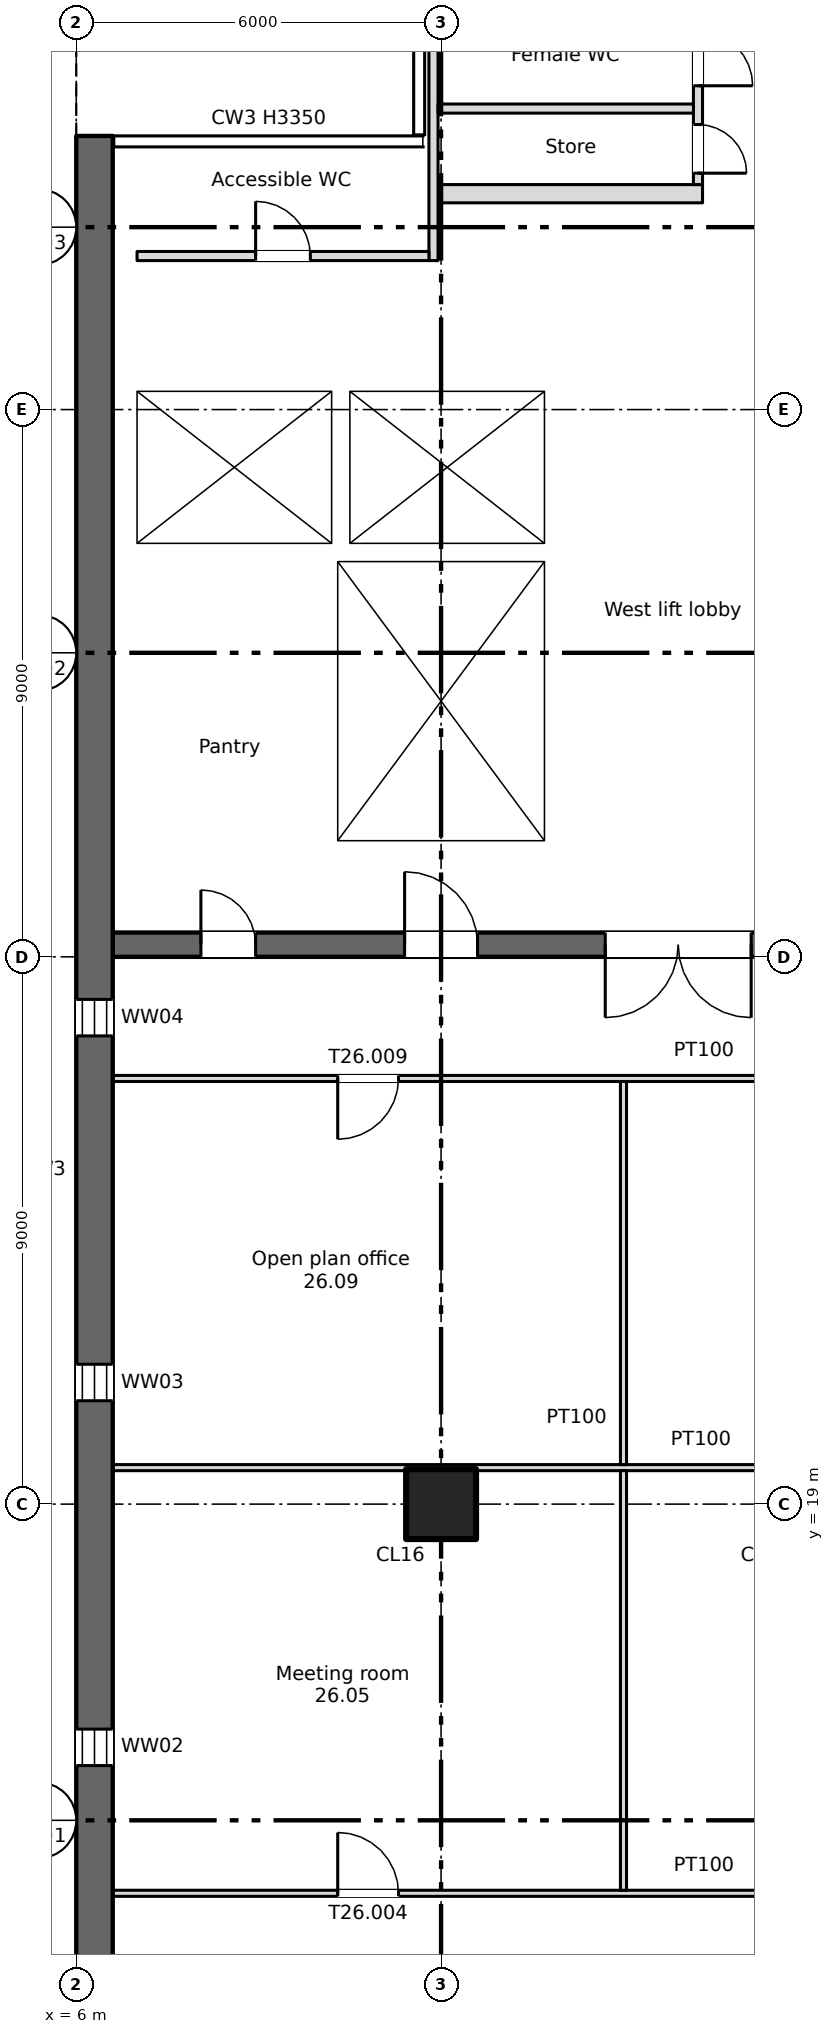
"""IFC4 building model, lengths in metres.
Left out: names, types, materials, properties, quantities, classifications, styles, units other than length and angle.
Written with IfcOpenShell. Run it as: python <this file> out.ifc"""

import sys

from ifc_helpers import new_model, si_unit, direction, frame, frame_2d, origin, origin_2d, place, context, subcontext, project, spatial, rectangle, extrude, element, fill, save


model = new_model("IFC4")
c1 = context("Model", 3, precision=1e-05, world=origin(), true_north=direction((0.0, 1.0)))
c2 = subcontext(c1, "Body", "Model", "MODEL_VIEW")
j1 = project(units=[si_unit("LENGTHUNIT", "METRE"), si_unit("PLANEANGLEUNIT", "RADIAN")], contexts=[c1])
p1 = place(None, origin())
s1 = spatial("IfcSite", under=j1, at=p1, CompositionType="ELEMENT")
p2 = place(p1, origin())
s2 = spatial("IfcBuilding", under=s1, at=p2, CompositionType="ELEMENT")
p3 = place(p2, frame((0.0, 0.0, 178.0)))
s3 = spatial("IfcBuildingStorey", under=s2, at=p3, CompositionType="ELEMENT", Elevation=178.0)
p4 = place(p3, frame((12.0, 19.0, 0.0), z_axis=(0.0, 0.0, 1.0), x_axis=(1.0, 0.0, 0.0)))
e1 = element("IfcColumn", 1, at=p4, inside=s3, PredefinedType="COLUMN", context=c2, shape_type="SweptSolid", body=[
    extrude(rectangle(XDim=1.15, YDim=1.15, at=origin_2d()), origin(), (0.0, 0.0, 1.0), 3.35),
])
p5 = place(p3, frame((6.3, 7.5, 0.0), z_axis=(0.0, 0.0, 1.0), x_axis=(0.0, 1.0, 0.0)))
e2 = element("IfcWall", 2, at=p5, inside=s3, PredefinedType="SHEAR", context=c2, shape_type="SweptSolid", body=[
    extrude(rectangle(XDim=34.0, YDim=0.6, at=frame_2d((17.0, 0.0))), origin(), (0.0, 0.0, 1.0), 3.35),
])
p6 = place(p5, frame((1.2, 0.0, 0.6)))
e3 = element("IfcOpeningElement", 3, at=p6, cuts=e2, PredefinedType="OPENING", context=c2, shape_type="SweptSolid", body=[
    extrude(rectangle(XDim=0.6, YDim=2.4, at=frame_2d((0.3, 1.2))), frame((0.0, 0.31, 0.0), z_axis=(0.0, -1.0, 0.0), x_axis=(1.0, 0.0, 0.0)), (0.0, 0.0, 1.0), 0.62),
])
p7 = place(p5, frame((7.2, 0.0, 0.6)))
e4 = element("IfcOpeningElement", 4, at=p7, cuts=e2, PredefinedType="OPENING", context=c2, shape_type="SweptSolid", body=[
    extrude(rectangle(XDim=0.6, YDim=2.4, at=frame_2d((0.3, 1.2))), frame((0.0, 0.31, 0.0), z_axis=(0.0, -1.0, 0.0), x_axis=(1.0, 0.0, 0.0)), (0.0, 0.0, 1.0), 0.62),
])
p8 = place(p5, frame((13.2, 0.0, 0.6)))
e5 = element("IfcOpeningElement", 5, at=p8, cuts=e2, PredefinedType="OPENING", context=c2, shape_type="SweptSolid", body=[
    extrude(rectangle(XDim=0.6, YDim=2.4, at=frame_2d((0.3, 1.2))), frame((0.0, 0.31, 0.0), z_axis=(0.0, -1.0, 0.0), x_axis=(1.0, 0.0, 0.0)), (0.0, 0.0, 1.0), 0.62),
])
p9 = place(p5, frame((19.2, 0.0, 0.6)))
e6 = element("IfcOpeningElement", 6, at=p9, cuts=e2, PredefinedType="OPENING", context=c2, shape_type="SweptSolid", body=[
    extrude(rectangle(XDim=0.6, YDim=2.4, at=frame_2d((0.3, 1.2))), frame((0.0, 0.31, 0.0), z_axis=(0.0, -1.0, 0.0), x_axis=(1.0, 0.0, 0.0)), (0.0, 0.0, 1.0), 0.62),
])
p10 = place(p3, frame((6.6, 28.2, 0.0), z_axis=(0.0, 0.0, 1.0), x_axis=(1.0, 0.0, 0.0)))
e7 = element("IfcWall", 7, at=p10, inside=s3, PredefinedType="SHEAR", context=c2, shape_type="SweptSolid", body=[
    extrude(rectangle(XDim=57.9, YDim=0.4, at=frame_2d((28.95, 0.0))), origin(), (0.0, 0.0, 1.0), 3.35),
])
p11 = place(p10, frame((12.163, 0.0, 0.0)))
e8 = element("IfcOpeningElement", 8, at=p11, cuts=e7, PredefinedType="OPENING", context=c2, shape_type="SweptSolid", body=[
    extrude(rectangle(XDim=0.9, YDim=2.1, at=frame_2d((0.45, 1.05))), frame((0.0, 0.21, 0.0), z_axis=(0.0, -1.0, 0.0), x_axis=(1.0, 0.0, 0.0)), (0.0, 0.0, 1.0), 0.42),
])
p12 = place(p10, frame((14.738, 0.0, 0.0)))
e9 = element("IfcOpeningElement", 9, at=p12, cuts=e7, PredefinedType="OPENING", context=c2, shape_type="SweptSolid", body=[
    extrude(rectangle(XDim=0.9, YDim=2.1, at=frame_2d((0.45, 1.05))), frame((0.0, 0.21, 0.0), z_axis=(0.0, -1.0, 0.0), x_axis=(1.0, 0.0, 0.0)), (0.0, 0.0, 1.0), 0.42),
])
p13 = place(p10, frame((49.163, 0.0, 0.0)))
e10 = element("IfcOpeningElement", 10, at=p13, cuts=e7, PredefinedType="OPENING", context=c2, shape_type="SweptSolid", body=[
    extrude(rectangle(XDim=0.9, YDim=2.1, at=frame_2d((0.45, 1.05))), frame((0.0, 0.21, 0.0), z_axis=(0.0, -1.0, 0.0), x_axis=(1.0, 0.0, 0.0)), (0.0, 0.0, 1.0), 0.42),
])
p14 = place(p10, frame((51.738, 0.0, 0.0)))
e11 = element("IfcOpeningElement", 11, at=p14, cuts=e7, PredefinedType="OPENING", context=c2, shape_type="SweptSolid", body=[
    extrude(rectangle(XDim=0.9, YDim=2.1, at=frame_2d((0.45, 1.05))), frame((0.0, 0.21, 0.0), z_axis=(0.0, -1.0, 0.0), x_axis=(1.0, 0.0, 0.0)), (0.0, 0.0, 1.0), 0.42),
])
p15 = place(p10, frame((1.45, 0.0, 0.0)))
e12 = element("IfcOpeningElement", 12, at=p15, cuts=e7, PredefinedType="OPENING", context=c2, shape_type="SweptSolid", body=[
    extrude(rectangle(XDim=0.9, YDim=2.1, at=frame_2d((0.45, 1.05))), frame((0.0, 0.21, 0.0), z_axis=(0.0, -1.0, 0.0), x_axis=(1.0, 0.0, 0.0)), (0.0, 0.0, 1.0), 0.42),
])
p16 = place(p10, frame((4.8, 0.0, 0.0)))
e13 = element("IfcOpeningElement", 13, at=p16, cuts=e7, PredefinedType="OPENING", context=c2, shape_type="SweptSolid", body=[
    extrude(rectangle(XDim=1.2, YDim=2.1, at=frame_2d((0.6, 1.05))), frame((0.0, 0.21, 0.0), z_axis=(0.0, -1.0, 0.0), x_axis=(1.0, 0.0, 0.0)), (0.0, 0.0, 1.0), 0.42),
])
p17 = place(p10, frame((31.8, 0.0, 0.0)))
e14 = element("IfcOpeningElement", 14, at=p17, cuts=e7, PredefinedType="OPENING", context=c2, shape_type="SweptSolid", body=[
    extrude(rectangle(XDim=1.2, YDim=2.1, at=frame_2d((0.6, 1.05))), frame((0.0, 0.21, 0.0), z_axis=(0.0, -1.0, 0.0), x_axis=(1.0, 0.0, 0.0)), (0.0, 0.0, 1.0), 0.42),
])
p18 = place(p10, frame((55.3, 0.0, 0.0)))
e15 = element("IfcOpeningElement", 15, at=p18, cuts=e7, PredefinedType="OPENING", context=c2, shape_type="SweptSolid", body=[
    extrude(rectangle(XDim=1.2, YDim=2.1, at=frame_2d((0.6, 1.05))), frame((0.0, 0.21, 0.0), z_axis=(0.0, -1.0, 0.0), x_axis=(1.0, 0.0, 0.0)), (0.0, 0.0, 1.0), 0.42),
])
p19 = place(p10, frame((21.8, 0.0, 0.0)))
e16 = element("IfcOpeningElement", 16, at=p19, cuts=e7, PredefinedType="OPENING", context=c2, shape_type="SweptSolid", body=[
    extrude(rectangle(XDim=1.2, YDim=2.1, at=frame_2d((0.6, 1.05))), frame((0.0, 0.21, 0.0), z_axis=(0.0, -1.0, 0.0), x_axis=(1.0, 0.0, 0.0)), (0.0, 0.0, 1.0), 0.42),
])
p20 = place(p10, frame((41.8, 0.0, 0.0)))
e17 = element("IfcOpeningElement", 17, at=p20, cuts=e7, PredefinedType="OPENING", context=c2, shape_type="SweptSolid", body=[
    extrude(rectangle(XDim=1.2, YDim=2.1, at=frame_2d((0.6, 1.05))), frame((0.0, 0.21, 0.0), z_axis=(0.0, -1.0, 0.0), x_axis=(1.0, 0.0, 0.0)), (0.0, 0.0, 1.0), 0.42),
])
p21 = place(p10, frame((24.95, 0.0, 0.0)))
e18 = element("IfcOpeningElement", 18, at=p21, cuts=e7, PredefinedType="OPENING", context=c2, shape_type="SweptSolid", body=[
    extrude(rectangle(XDim=2.4, YDim=2.1, at=frame_2d((1.2, 1.05))), frame((0.0, 0.21, 0.0), z_axis=(0.0, -1.0, 0.0), x_axis=(1.0, 0.0, 0.0)), (0.0, 0.0, 1.0), 0.42),
])
p22 = place(p10, frame((37.45, 0.0, 0.0)))
e19 = element("IfcOpeningElement", 19, at=p22, cuts=e7, PredefinedType="OPENING", context=c2, shape_type="SweptSolid", body=[
    extrude(rectangle(XDim=2.4, YDim=2.1, at=frame_2d((1.2, 1.05))), frame((0.0, 0.21, 0.0), z_axis=(0.0, -1.0, 0.0), x_axis=(1.0, 0.0, 0.0)), (0.0, 0.0, 1.0), 0.42),
])
p23 = place(p10, frame((8.1, 0.0, 0.0)))
e20 = element("IfcOpeningElement", 20, at=p23, cuts=e7, PredefinedType="OPENING", context=c2, shape_type="SweptSolid", body=[
    extrude(rectangle(XDim=2.4, YDim=2.1, at=frame_2d((1.2, 1.05))), frame((0.0, 0.21, 0.0), z_axis=(0.0, -1.0, 0.0), x_axis=(1.0, 0.0, 0.0)), (0.0, 0.0, 1.0), 0.42),
])
p24 = place(p10, frame((28.95, 0.0, 0.0)))
e21 = element("IfcOpeningElement", 21, at=p24, cuts=e7, PredefinedType="OPENING", context=c2, shape_type="SweptSolid", body=[
    extrude(rectangle(XDim=0.9, YDim=2.1, at=frame_2d((0.45, 1.05))), frame((0.0, 0.21, 0.0), z_axis=(0.0, -1.0, 0.0), x_axis=(1.0, 0.0, 0.0)), (0.0, 0.0, 1.0), 0.42),
])
p25 = place(p10, frame((34.95, 0.0, 0.0)))
e22 = element("IfcOpeningElement", 22, at=p25, cuts=e7, PredefinedType="OPENING", context=c2, shape_type="SweptSolid", body=[
    extrude(rectangle(XDim=0.9, YDim=2.1, at=frame_2d((0.45, 1.05))), frame((0.0, 0.21, 0.0), z_axis=(0.0, -1.0, 0.0), x_axis=(1.0, 0.0, 0.0)), (0.0, 0.0, 1.0), 0.42),
])
p26 = place(p3, frame((6.8, 28.4, 0.0), z_axis=(0.0, 0.0, 1.0), x_axis=(0.0, 1.0, 0.0)))
e23 = element("IfcWall", 23, at=p26, inside=s3, PredefinedType="SHEAR", context=c2, shape_type="SweptSolid", body=[
    extrude(rectangle(XDim=12.85, YDim=0.4, at=frame_2d((6.425, 0.0))), origin(), (0.0, 0.0, 1.0), 3.35),
])
for number, where, z_axis, x_axis in (
    (24, (10.15, 28.4, 0.0), (0.0, 0.0, 1.0), (0.0, 1.0, 0.0)),
    (25, (13.85, 28.4, 0.0), (0.0, 0.0, 1.0), (0.0, 1.0, 0.0)),
):
    element("IfcWall", number, at=place(p3, frame(where, z_axis=z_axis, x_axis=x_axis)), inside=s3, PredefinedType="SHEAR", context=c2, shape_type="SweptSolid", body=[
        extrude(rectangle(XDim=6.1, YDim=0.3, at=frame_2d((3.05, 0.0))), origin(), (0.0, 0.0, 1.0), 3.35),
    ])
for number, where, z_axis, x_axis in (
    (26, (7.0, 34.65, 0.0), (0.0, 0.0, 1.0), (1.0, 0.0, 0.0)),
    (27, (7.0, 37.45, 0.0), (0.0, 0.0, 1.0), (1.0, 0.0, 0.0)),
):
    element("IfcWall", number, at=place(p3, frame(where, z_axis=z_axis, x_axis=x_axis)), inside=s3, PredefinedType="SHEAR", context=c2, shape_type="SweptSolid", body=[
        extrude(rectangle(XDim=7.0, YDim=0.3, at=frame_2d((3.5, 0.0))), origin(), (0.0, 0.0, 1.0), 3.35),
    ])
p27 = place(p3, frame((13.85, 34.8, 0.0), z_axis=(0.0, 0.0, 1.0), x_axis=(0.0, 1.0, 0.0)))
e28 = element("IfcWall", 28, at=p27, inside=s3, PredefinedType="SHEAR", context=c2, shape_type="SweptSolid", body=[
    extrude(rectangle(XDim=2.5, YDim=0.3, at=frame_2d((1.25, 0.0))), origin(), (0.0, 0.0, 1.0), 3.35),
])
p28 = place(p3, frame((11.95, 40.55, 0.0), z_axis=(0.0, 0.0, 1.0), x_axis=(1.0, 0.0, 0.0)))
e29 = element("IfcWall", 29, at=p28, inside=s3, PredefinedType="PARTITIONING", context=c2, shape_type="SweptSolid", body=[
    extrude(rectangle(XDim=4.35, YDim=0.3, at=frame_2d((2.175, 0.0))), origin(), (0.0, 0.0, 1.0), 3.35),
])
p29 = place(p3, frame((10.35, 34.8, 0.0), z_axis=(0.0, 0.0, 1.0), x_axis=(0.0, 1.0, 0.0)))
e30 = element("IfcWall", 30, at=p29, inside=s3, PredefinedType="SHEAR", context=c2, shape_type="SweptSolid", body=[
    extrude(rectangle(XDim=2.5, YDim=0.3, at=frame_2d((1.25, 0.0))), origin(), (0.0, 0.0, 1.0), 3.35),
])
p30 = place(p3, frame((16.225, 45.3, 0.0), z_axis=(0.0, 0.0, 1.0), x_axis=(0.0, -1.0, 0.0)))
e31 = element("IfcWall", 31, at=p30, inside=s3, PredefinedType="PARTITIONING", context=c2, shape_type="SweptSolid", body=[
    extrude(rectangle(XDim=4.6, YDim=0.15, at=frame_2d((2.3, 0.0))), origin(), (0.0, 0.0, 1.0), 3.35),
])
p31 = place(p30, frame((3.613, 0.0, 0.0)))
e32 = element("IfcOpeningElement", 32, at=p31, cuts=e31, PredefinedType="OPENING", context=c2, shape_type="SweptSolid", body=[
    extrude(rectangle(XDim=0.8, YDim=2.1, at=frame_2d((0.4, 1.05))), frame((0.0, 0.085, 0.0), z_axis=(0.0, -1.0, 0.0), x_axis=(1.0, 0.0, 0.0)), (0.0, 0.0, 1.0), 0.17),
])
p32 = place(p30, frame((2.075, 0.0, 0.0)))
e33 = element("IfcOpeningElement", 33, at=p32, cuts=e31, PredefinedType="OPENING", context=c2, shape_type="SweptSolid", body=[
    extrude(rectangle(XDim=0.9, YDim=2.1, at=frame_2d((0.45, 1.05))), frame((0.0, 0.085, 0.0), z_axis=(0.0, -1.0, 0.0), x_axis=(1.0, 0.0, 0.0)), (0.0, 0.0, 1.0), 0.17),
])
p33 = place(p30, frame((0.363, 0.0, 0.0)))
e34 = element("IfcOpeningElement", 34, at=p33, cuts=e31, PredefinedType="OPENING", context=c2, shape_type="SweptSolid", body=[
    extrude(rectangle(XDim=0.9, YDim=2.1, at=frame_2d((0.45, 1.05))), frame((0.0, 0.085, 0.0), z_axis=(0.0, -1.0, 0.0), x_axis=(1.0, 0.0, 0.0)), (0.0, 0.0, 1.0), 0.17),
])
p34 = place(p3, frame((11.875, 39.45, 0.0), z_axis=(0.0, 0.0, 1.0), x_axis=(0.0, 1.0, 0.0)))
e35 = element("IfcWall", 35, at=p34, inside=s3, PredefinedType="PARTITIONING", context=c2, shape_type="SweptSolid", body=[
    extrude(rectangle(XDim=5.85, YDim=0.15, at=frame_2d((2.925, 0.0))), origin(), (0.0, 0.0, 1.0), 3.35),
])
p35 = place(p3, frame((7.0, 39.525, 0.0), z_axis=(0.0, 0.0, 1.0), x_axis=(1.0, 0.0, 0.0)))
e36 = element("IfcWall", 36, at=p35, inside=s3, PredefinedType="PARTITIONING", context=c2, shape_type="SweptSolid", body=[
    extrude(rectangle(XDim=4.8, YDim=0.15, at=frame_2d((2.4, 0.0))), origin(), (0.0, 0.0, 1.0), 3.35),
])
p36 = place(p35, frame((1.95, 0.0, 0.0)))
e37 = element("IfcOpeningElement", 37, at=p36, cuts=e36, PredefinedType="OPENING", context=c2, shape_type="SweptSolid", body=[
    extrude(rectangle(XDim=0.9, YDim=2.1, at=frame_2d((0.45, 1.05))), frame((0.0, 0.085, 0.0), z_axis=(0.0, -1.0, 0.0), x_axis=(1.0, 0.0, 0.0)), (0.0, 0.0, 1.0), 0.17),
])
p37 = place(p3, frame((11.95, 41.95, 0.0), z_axis=(0.0, 0.0, 1.0), x_axis=(1.0, 0.0, 0.0)))
e38 = element("IfcWall", 38, at=p37, inside=s3, PredefinedType="PARTITIONING", context=c2, shape_type="SweptSolid", body=[
    extrude(rectangle(XDim=4.2, YDim=0.15, at=frame_2d((2.1, 0.0))), origin(), (0.0, 0.0, 1.0), 3.35),
])
p38 = place(p3, frame((6.6, 12.6, 0.0), z_axis=(0.0, 0.0, 1.0), x_axis=(1.0, 0.0, 0.0)))
e39 = element("IfcWall", 39, at=p38, inside=s3, PredefinedType="PARTITIONING", context=c2, shape_type="SweptSolid", body=[
    extrude(rectangle(XDim=19.45, YDim=0.1, at=frame_2d((9.725, 0.0))), origin(), (0.0, 0.0, 1.0), 3.35),
])
p39 = place(p38, frame((3.7, 0.0, 0.0)))
e40 = element("IfcOpeningElement", 40, at=p39, cuts=e39, PredefinedType="OPENING", context=c2, shape_type="SweptSolid", body=[
    extrude(rectangle(XDim=1.0, YDim=2.1, at=frame_2d((0.5, 1.05))), frame((0.0, 0.06, 0.0), z_axis=(0.0, -1.0, 0.0), x_axis=(1.0, 0.0, 0.0)), (0.0, 0.0, 1.0), 0.12),
])
p40 = place(p38, frame((13.0, 0.0, 0.0)))
e41 = element("IfcOpeningElement", 41, at=p40, cuts=e39, PredefinedType="OPENING", context=c2, shape_type="SweptSolid", body=[
    extrude(rectangle(XDim=1.8, YDim=2.1, at=frame_2d((0.9, 1.05))), frame((0.0, 0.06, 0.0), z_axis=(0.0, -1.0, 0.0), x_axis=(1.0, 0.0, 0.0)), (0.0, 0.0, 1.0), 0.12),
])
p41 = place(p3, frame((6.6, 19.6, 0.0), z_axis=(0.0, 0.0, 1.0), x_axis=(1.0, 0.0, 0.0)))
e42 = element("IfcWall", 42, at=p41, inside=s3, PredefinedType="PARTITIONING", context=c2, shape_type="SweptSolid", body=[
    extrude(rectangle(XDim=19.35, YDim=0.1, at=frame_2d((9.675, 0.0))), origin(), (0.0, 0.0, 1.0), 3.35),
])
p42 = place(p3, frame((6.6, 26.0, 0.0), z_axis=(0.0, 0.0, 1.0), x_axis=(1.0, 0.0, 0.0)))
e43 = element("IfcWall", 43, at=p42, inside=s3, PredefinedType="PARTITIONING", context=c2, shape_type="SweptSolid", body=[
    extrude(rectangle(XDim=19.45, YDim=0.1, at=frame_2d((9.725, 0.0))), origin(), (0.0, 0.0, 1.0), 3.35),
])
p43 = place(p42, frame((3.7, 0.0, 0.0)))
e44 = element("IfcOpeningElement", 44, at=p43, cuts=e43, PredefinedType="OPENING", context=c2, shape_type="SweptSolid", body=[
    extrude(rectangle(XDim=1.0, YDim=2.1, at=frame_2d((0.5, 1.05))), frame((0.0, 0.06, 0.0), z_axis=(0.0, -1.0, 0.0), x_axis=(1.0, 0.0, 0.0)), (0.0, 0.0, 1.0), 0.12),
])
p44 = place(p42, frame((13.0, 0.0, 0.0)))
e45 = element("IfcOpeningElement", 45, at=p44, cuts=e43, PredefinedType="OPENING", context=c2, shape_type="SweptSolid", body=[
    extrude(rectangle(XDim=1.8, YDim=2.1, at=frame_2d((0.9, 1.05))), frame((0.0, 0.06, 0.0), z_axis=(0.0, -1.0, 0.0), x_axis=(1.0, 0.0, 0.0)), (0.0, 0.0, 1.0), 0.12),
])
p45 = place(p3, frame((15.0, 12.65, 0.0), z_axis=(0.0, 0.0, 1.0), x_axis=(0.0, 1.0, 0.0)))
e46 = element("IfcWall", 46, at=p45, inside=s3, PredefinedType="PARTITIONING", context=c2, shape_type="SweptSolid", body=[
    extrude(rectangle(XDim=6.9, YDim=0.1, at=frame_2d((3.45, 0.0))), origin(), (0.0, 0.0, 1.0), 3.35),
])
p46 = place(p3, frame((15.0, 19.65, 0.0), z_axis=(0.0, 0.0, 1.0), x_axis=(0.0, 1.0, 0.0)))
e47 = element("IfcWall", 47, at=p46, inside=s3, PredefinedType="PARTITIONING", context=c2, shape_type="SweptSolid", body=[
    extrude(rectangle(XDim=6.3, YDim=0.1, at=frame_2d((3.15, 0.0))), origin(), (0.0, 0.0, 1.0), 3.35),
])
p47 = place(p7, origin())
e48 = element("IfcWindow", 48, at=p47, inside=s3, PartitioningType="SINGLE_PANEL", PredefinedType="WINDOW", context=c2, shape_type="SweptSolid", body=[
    extrude(rectangle(XDim=0.6, YDim=2.4, at=frame_2d((0.3, 1.2))), frame((0.0, 0.03, 0.0), z_axis=(0.0, -1.0, 0.0), x_axis=(1.0, 0.0, 0.0)), (0.0, 0.0, 1.0), 0.06),
])
fill(e4, e48)
p48 = place(p8, origin())
e49 = element("IfcWindow", 49, at=p48, inside=s3, PartitioningType="SINGLE_PANEL", PredefinedType="WINDOW", context=c2, shape_type="SweptSolid", body=[
    extrude(rectangle(XDim=0.6, YDim=2.4, at=frame_2d((0.3, 1.2))), frame((0.0, 0.03, 0.0), z_axis=(0.0, -1.0, 0.0), x_axis=(1.0, 0.0, 0.0)), (0.0, 0.0, 1.0), 0.06),
])
fill(e5, e49)
p49 = place(p9, origin())
e50 = element("IfcWindow", 50, at=p49, inside=s3, PartitioningType="SINGLE_PANEL", PredefinedType="WINDOW", context=c2, shape_type="SweptSolid", body=[
    extrude(rectangle(XDim=0.6, YDim=2.4, at=frame_2d((0.3, 1.2))), frame((0.0, 0.03, 0.0), z_axis=(0.0, -1.0, 0.0), x_axis=(1.0, 0.0, 0.0)), (0.0, 0.0, 1.0), 0.06),
])
fill(e6, e50)
p50 = place(p15, origin())
e51 = element("IfcDoor", 51, at=p50, inside=s3, OperationType="SINGLE_SWING_LEFT", PredefinedType="DOOR", context=c2, shape_type="SweptSolid", body=[
    extrude(rectangle(XDim=0.9, YDim=2.1, at=frame_2d((0.45, 1.05))), frame((0.0, 0.025, 0.0), z_axis=(0.0, -1.0, 0.0), x_axis=(1.0, 0.0, 0.0)), (0.0, 0.0, 1.0), 0.05),
])
fill(e12, e51)
p51 = place(p36, origin())
e52 = element("IfcDoor", 52, at=p51, inside=s3, OperationType="SINGLE_SWING_LEFT", PredefinedType="DOOR", context=c2, shape_type="SweptSolid", body=[
    extrude(rectangle(XDim=0.9, YDim=2.1, at=frame_2d((0.45, 1.05))), frame((0.0, 0.025, 0.0), z_axis=(0.0, -1.0, 0.0), x_axis=(1.0, 0.0, 0.0)), (0.0, 0.0, 1.0), 0.05),
])
fill(e37, e52)
p52 = place(p31, origin())
e53 = element("IfcDoor", 53, at=p52, inside=s3, OperationType="SINGLE_SWING_RIGHT", PredefinedType="DOOR", context=c2, shape_type="SweptSolid", body=[
    extrude(rectangle(XDim=0.8, YDim=2.1, at=frame_2d((0.4, 1.05))), frame((0.0, 0.025, 0.0), z_axis=(0.0, -1.0, 0.0), x_axis=(1.0, 0.0, 0.0)), (0.0, 0.0, 1.0), 0.05),
])
fill(e32, e53)
p53 = place(p32, origin())
e54 = element("IfcDoor", 54, at=p53, inside=s3, OperationType="SINGLE_SWING_RIGHT", PredefinedType="DOOR", context=c2, shape_type="SweptSolid", body=[
    extrude(rectangle(XDim=0.9, YDim=2.1, at=frame_2d((0.45, 1.05))), frame((0.0, 0.025, 0.0), z_axis=(0.0, -1.0, 0.0), x_axis=(1.0, 0.0, 0.0)), (0.0, 0.0, 1.0), 0.05),
])
fill(e33, e54)
p54 = place(p16, origin())
e55 = element("IfcDoor", 55, at=p54, inside=s3, OperationType="SINGLE_SWING_LEFT", PredefinedType="DOOR", context=c2, shape_type="SweptSolid", body=[
    extrude(rectangle(XDim=1.2, YDim=2.1, at=frame_2d((0.6, 1.05))), frame((0.0, 0.025, 0.0), z_axis=(0.0, -1.0, 0.0), x_axis=(1.0, 0.0, 0.0)), (0.0, 0.0, 1.0), 0.05),
])
fill(e13, e55)
p55 = place(p23, origin())
e56 = element("IfcDoor", 56, at=p55, inside=s3, OperationType="DOUBLE_DOOR_SINGLE_SWING", PredefinedType="DOOR", context=c2, shape_type="SweptSolid", body=[
    extrude(rectangle(XDim=2.4, YDim=2.1, at=frame_2d((1.2, 1.05))), frame((0.0, 0.025, 0.0), z_axis=(0.0, -1.0, 0.0), x_axis=(1.0, 0.0, 0.0)), (0.0, 0.0, 1.0), 0.05),
])
fill(e20, e56)
p56 = place(p39, origin())
e57 = element("IfcDoor", 57, at=p56, inside=s3, OperationType="SINGLE_SWING_LEFT", PredefinedType="DOOR", context=c2, shape_type="SweptSolid", body=[
    extrude(rectangle(XDim=1.0, YDim=2.1, at=frame_2d((0.5, 1.05))), frame((0.0, 0.025, 0.0), z_axis=(0.0, -1.0, 0.0), x_axis=(1.0, 0.0, 0.0)), (0.0, 0.0, 1.0), 0.05),
])
fill(e40, e57)
p57 = place(p43, origin())
e58 = element("IfcDoor", 58, at=p57, inside=s3, OperationType="SINGLE_SWING_LEFT", PredefinedType="DOOR", context=c2, shape_type="SweptSolid", body=[
    extrude(rectangle(XDim=1.0, YDim=2.1, at=frame_2d((0.5, 1.05))), frame((0.0, 0.025, 0.0), z_axis=(0.0, -1.0, 0.0), x_axis=(1.0, 0.0, 0.0)), (0.0, 0.0, 1.0), 0.05),
])
fill(e44, e58)
save(model, sys.argv[1])
